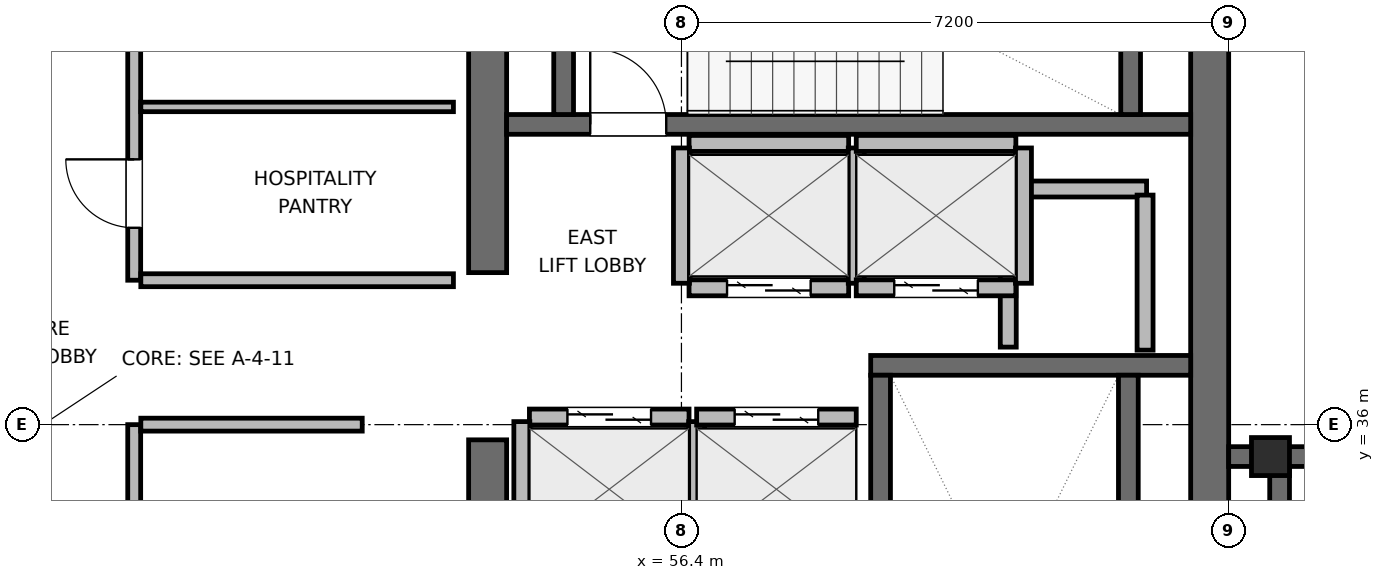
"""IFC4 building model, lengths in metres.
Left out: names, types, materials, properties, quantities, classifications, styles, units other than length and angle.
Written with IfcOpenShell. Run it as: python <this file> out.ifc"""

import sys

from ifc_helpers import new_model, si_unit, direction, frame, frame_2d, origin, origin_2d, place, context, subcontext, project, spatial, rectangle, hollow_rectangle, extrude, element, fill, save


model = new_model("IFC4")
c1 = context("Model", 3, precision=1e-05, world=origin(), true_north=direction((0.0, 1.0)))
c2 = subcontext(c1, "Body", "Model", "MODEL_VIEW")
j1 = project(units=[si_unit("LENGTHUNIT", "METRE"), si_unit("PLANEANGLEUNIT", "RADIAN")], contexts=[c1])
p1 = place(None, origin())
s1 = spatial("IfcSite", under=j1, at=p1, CompositionType="ELEMENT")
p2 = place(p1, origin())
s2 = spatial("IfcBuilding", under=s1, at=p2, CompositionType="ELEMENT")
p3 = place(p2, frame((0.0, 0.0, 350.4)))
s3 = spatial("IfcBuildingStorey", under=s2, at=p3, CompositionType="ELEMENT", Elevation=350.4)
p4 = place(p3, frame((53.85, 27.85, 0.0), z_axis=(0.0, 0.0, 1.0), x_axis=(0.0, 1.0, 0.0)))
e1 = element("IfcWall", 1, at=p4, inside=s3, PredefinedType="SHEAR", context=c2, shape_type="SweptSolid", body=[
    extrude(rectangle(XDim=7.95, YDim=0.5, at=frame_2d((3.975, 0.0))), origin(), (0.0, 0.0, 1.0), 4.5),
])
p5 = place(p3, frame((53.85, 38.0, 0.0), z_axis=(0.0, 0.0, 1.0), x_axis=(0.0, 1.0, 0.0)))
e2 = element("IfcWall", 2, at=p5, inside=s3, PredefinedType="SHEAR", context=c2, shape_type="SweptSolid", body=[
    extrude(rectangle(XDim=6.15, YDim=0.5, at=frame_2d((3.075, 0.0))), origin(), (0.0, 0.0, 1.0), 4.5),
])
p6 = place(p3, frame((63.35, 27.6, 0.0), z_axis=(0.0, 0.0, 1.0), x_axis=(0.0, 1.0, 0.0)))
e3 = element("IfcWall", 3, at=p6, inside=s3, PredefinedType="SHEAR", context=c2, shape_type="SweptSolid", body=[
    extrude(rectangle(XDim=16.8, YDim=0.5, at=frame_2d((8.4, 0.0))), origin(), (0.0, 0.0, 1.0), 4.5),
])
p7 = place(p3, frame((58.89, 36.78, 0.0), z_axis=(0.0, 0.0, 1.0), x_axis=(1.0, 0.0, 0.0)))
e4 = element("IfcWall", 4, at=p7, inside=s3, PredefinedType="SHEAR", context=c2, shape_type="SweptSolid", body=[
    extrude(rectangle(XDim=4.21, YDim=0.26, at=frame_2d((2.105, 0.0))), origin(), (0.0, 0.0, 1.0), 4.5),
])
p8 = place(p3, frame((59.02, 29.05, 0.0), z_axis=(0.0, 0.0, 1.0), x_axis=(0.0, 1.0, 0.0)))
e5 = element("IfcWall", 5, at=p8, inside=s3, PredefinedType="SHEAR", context=c2, shape_type="SweptSolid", body=[
    extrude(rectangle(XDim=7.6, YDim=0.26, at=frame_2d((3.8, 0.0))), origin(), (0.0, 0.0, 1.0), 4.5),
])
p9 = place(p8, frame((0.3, 0.0, 0.0)))
e6 = element("IfcOpeningElement", 6, at=p9, cuts=e5, PredefinedType="OPENING", context=c2, shape_type="SweptSolid", body=[
    extrude(rectangle(XDim=1.0, YDim=2.04, at=frame_2d((0.5, 1.02))), frame((0.0, 0.14, 0.0), z_axis=(0.0, -1.0, 0.0), x_axis=(1.0, 0.0, 0.0)), (0.0, 0.0, 1.0), 0.28),
])
p10 = place(p3, frame((62.28, 29.05, 0.0), z_axis=(0.0, 0.0, 1.0), x_axis=(0.0, 1.0, 0.0)))
e7 = element("IfcWall", 7, at=p10, inside=s3, PredefinedType="SHEAR", context=c2, shape_type="SweptSolid", body=[
    extrude(rectangle(XDim=7.6, YDim=0.26, at=frame_2d((3.8, 0.0))), origin(), (0.0, 0.0, 1.0), 4.5),
])
p11 = place(p3, frame((54.1, 39.95, 0.0), z_axis=(0.0, 0.0, 1.0), x_axis=(1.0, 0.0, 0.0)))
e8 = element("IfcWall", 8, at=p11, inside=s3, PredefinedType="SHEAR", context=c2, shape_type="SweptSolid", body=[
    extrude(rectangle(XDim=9.0, YDim=0.26, at=frame_2d((4.5, 0.0))), origin(), (0.0, 0.0, 1.0), 4.5),
])
p12 = place(p11, frame((1.1, 0.0, 0.0)))
e9 = element("IfcOpeningElement", 9, at=p12, cuts=e8, PredefinedType="OPENING", context=c2, shape_type="SweptSolid", body=[
    extrude(rectangle(XDim=1.0, YDim=2.04, at=frame_2d((0.5, 1.02))), frame((0.0, 0.14, 0.0), z_axis=(0.0, -1.0, 0.0), x_axis=(1.0, 0.0, 0.0)), (0.0, 0.0, 1.0), 0.28),
])
for number, where, z_axis, x_axis in (
    (10, (54.85, 40.08, 0.0), (0.0, 0.0, 1.0), (0.0, 1.0, 0.0)),
    (11, (62.31, 40.08, 0.0), (0.0, 0.0, 1.0), (0.0, 1.0, 0.0)),
):
    element("IfcWall", number, at=place(p3, frame(where, z_axis=z_axis, x_axis=x_axis)), inside=s3, PredefinedType="SHEAR", context=c2, shape_type="SweptSolid", body=[
        extrude(rectangle(XDim=2.94, YDim=0.26, at=frame_2d((1.47, 0.0))), origin(), (0.0, 0.0, 1.0), 4.5),
    ])
p13 = place(p3, frame((63.6, 35.58, 0.0), z_axis=(0.0, 0.0, 1.0), x_axis=(1.0, 0.0, 0.0)))
e12 = element("IfcWall", 12, at=p13, inside=s3, PredefinedType="SHEAR", context=c2, shape_type="SweptSolid", body=[
    extrude(rectangle(XDim=4.06, YDim=0.26, at=frame_2d((2.03, 0.0))), origin(), (0.0, 0.0, 1.0), 4.5),
])
p14 = place(p3, frame((64.27, 28.0, 0.0), z_axis=(0.0, 0.0, 1.0), x_axis=(0.0, 1.0, 0.0)))
e13 = element("IfcWall", 13, at=p14, inside=s3, PredefinedType="SHEAR", context=c2, shape_type="SweptSolid", body=[
    extrude(rectangle(XDim=7.45, YDim=0.26, at=frame_2d((3.725, 0.0))), origin(), (0.0, 0.0, 1.0), 4.5),
])
p15 = place(p3, frame((64.15, 35.58, 0.0), z_axis=(0.0, 0.0, 1.0), x_axis=(1.0, 0.0, 0.0)))
e14 = element("IfcColumn", 14, at=p15, inside=s3, PredefinedType="PILASTER", context=c2, shape_type="SweptSolid", body=[
    extrude(hollow_rectangle(XDim=0.5, YDim=0.5, WallThickness=0.025, at=origin_2d()), origin(), (0.0, 0.0, 1.0), 4.5),
])
p16 = place(p3, frame((60.72, 39.1, 0.0), z_axis=(0.0, 0.0, 1.0), x_axis=(1.0, 0.0, 0.0)))
e15 = element("IfcWall", 15, at=p16, inside=s3, PredefinedType="PARTITIONING", context=c2, shape_type="SweptSolid", body=[
    extrude(rectangle(XDim=1.8, YDim=0.21, at=frame_2d((0.9, 0.0))), origin(), (0.0, 0.0, 1.0), 4.2),
])
p17 = place(p3, frame((60.7, 37.02, 0.0), z_axis=(0.0, 0.0, 1.0), x_axis=(0.0, 1.0, 0.0)))
e16 = element("IfcWall", 16, at=p17, inside=s3, PredefinedType="PARTITIONING", context=c2, shape_type="SweptSolid", body=[
    extrude(rectangle(XDim=1.96, YDim=0.21, at=frame_2d((0.98, 0.0))), origin(), (0.0, 0.0, 1.0), 4.2),
])
p18 = place(p3, frame((62.5, 36.98, 0.0), z_axis=(0.0, 0.0, 1.0), x_axis=(0.0, 1.0, 0.0)))
e17 = element("IfcWall", 17, at=p18, inside=s3, PredefinedType="PARTITIONING", context=c2, shape_type="SweptSolid", body=[
    extrude(rectangle(XDim=2.04, YDim=0.21, at=frame_2d((1.02, 0.0))), origin(), (0.0, 0.0, 1.0), 4.2),
])
p19 = place(p3, frame((54.4, 36.1, 0.0), z_axis=(0.0, 0.0, 1.0), x_axis=(1.0, 0.0, 0.0)))
e18 = element("IfcWall", 18, at=p19, inside=s3, PredefinedType="PARTITIONING", context=c2, shape_type="SweptSolid", body=[
    extrude(rectangle(XDim=2.1, YDim=0.21, at=frame_2d((1.05, 0.0))), origin(), (0.0, 0.0, 1.0), 4.2),
])
p20 = place(p19, frame((0.5, 0.0, 0.0)))
e19 = element("IfcOpeningElement", 19, at=p20, cuts=e18, PredefinedType="OPENING", context=c2, shape_type="SweptSolid", body=[
    extrude(rectangle(XDim=1.1, YDim=2.04, at=frame_2d((0.55, 1.02))), frame((0.0, 0.115, 0.0), z_axis=(0.0, -1.0, 0.0), x_axis=(1.0, 0.0, 0.0)), (0.0, 0.0, 1.0), 0.23),
])
for number, where, z_axis, x_axis in (
    (20, (54.3, 34.26, 0.0), (0.0, 0.0, 1.0), (0.0, 1.0, 0.0)),
    (21, (56.6, 34.26, 0.0), (0.0, 0.0, 1.0), (0.0, 1.0, 0.0)),
):
    element("IfcWall", number, at=place(p3, frame(where, z_axis=z_axis, x_axis=x_axis)), inside=s3, PredefinedType="PARTITIONING", context=c2, shape_type="SweptSolid", body=[
        extrude(rectangle(XDim=1.78, YDim=0.21, at=frame_2d((0.89, 0.0))), origin(), (0.0, 0.0, 1.0), 4.2),
    ])
p21 = place(p3, frame((56.6, 36.1, 0.0), z_axis=(0.0, 0.0, 1.0), x_axis=(1.0, 0.0, 0.0)))
e22 = element("IfcWall", 22, at=p21, inside=s3, PredefinedType="PARTITIONING", context=c2, shape_type="SweptSolid", body=[
    extrude(rectangle(XDim=2.1, YDim=0.21, at=frame_2d((1.05, 0.0))), origin(), (0.0, 0.0, 1.0), 4.2),
])
p22 = place(p21, frame((0.5, 0.0, 0.0)))
e23 = element("IfcOpeningElement", 23, at=p22, cuts=e22, PredefinedType="OPENING", context=c2, shape_type="SweptSolid", body=[
    extrude(rectangle(XDim=1.1, YDim=2.04, at=frame_2d((0.55, 1.02))), frame((0.0, 0.115, 0.0), z_axis=(0.0, -1.0, 0.0), x_axis=(1.0, 0.0, 0.0)), (0.0, 0.0, 1.0), 0.23),
])
p23 = place(p3, frame((56.5, 37.8, 0.0), z_axis=(0.0, 0.0, 1.0), x_axis=(1.0, 0.0, 0.0)))
e24 = element("IfcWall", 24, at=p23, inside=s3, PredefinedType="PARTITIONING", context=c2, shape_type="SweptSolid", body=[
    extrude(rectangle(XDim=2.1, YDim=0.21, at=frame_2d((1.05, 0.0))), origin(), (0.0, 0.0, 1.0), 4.2),
])
p24 = place(p23, frame((0.5, 0.0, 0.0)))
e25 = element("IfcOpeningElement", 25, at=p24, cuts=e24, PredefinedType="OPENING", context=c2, shape_type="SweptSolid", body=[
    extrude(rectangle(XDim=1.1, YDim=2.04, at=frame_2d((0.55, 1.02))), frame((0.0, 0.115, 0.0), z_axis=(0.0, -1.0, 0.0), x_axis=(1.0, 0.0, 0.0)), (0.0, 0.0, 1.0), 0.23),
])
p25 = place(p3, frame((56.5, 39.7, 0.0), z_axis=(0.0, 0.0, 1.0), x_axis=(1.0, 0.0, 0.0)))
e26 = element("IfcWall", 26, at=p25, inside=s3, PredefinedType="PARTITIONING", context=c2, shape_type="SweptSolid", body=[
    extrude(rectangle(XDim=2.1, YDim=0.21, at=frame_2d((1.05, 0.0))), origin(), (0.0, 0.0, 1.0), 4.2),
])
for number, where, z_axis, x_axis in (
    (27, (56.4, 37.86, 0.0), (0.0, 0.0, 1.0), (0.0, 1.0, 0.0)),
    (28, (58.7, 37.86, 0.0), (0.0, 0.0, 1.0), (0.0, 1.0, 0.0)),
):
    element("IfcWall", number, at=place(p3, frame(where, z_axis=z_axis, x_axis=x_axis)), inside=s3, PredefinedType="PARTITIONING", context=c2, shape_type="SweptSolid", body=[
        extrude(rectangle(XDim=1.78, YDim=0.21, at=frame_2d((0.89, 0.0))), origin(), (0.0, 0.0, 1.0), 4.2),
    ])
p26 = place(p3, frame((58.7, 37.8, 0.0), z_axis=(0.0, 0.0, 1.0), x_axis=(1.0, 0.0, 0.0)))
e29 = element("IfcWall", 29, at=p26, inside=s3, PredefinedType="PARTITIONING", context=c2, shape_type="SweptSolid", body=[
    extrude(rectangle(XDim=2.1, YDim=0.21, at=frame_2d((1.05, 0.0))), origin(), (0.0, 0.0, 1.0), 4.2),
])
p27 = place(p26, frame((0.5, 0.0, 0.0)))
e30 = element("IfcOpeningElement", 30, at=p27, cuts=e29, PredefinedType="OPENING", context=c2, shape_type="SweptSolid", body=[
    extrude(rectangle(XDim=1.1, YDim=2.04, at=frame_2d((0.55, 1.02))), frame((0.0, 0.115, 0.0), z_axis=(0.0, -1.0, 0.0), x_axis=(1.0, 0.0, 0.0)), (0.0, 0.0, 1.0), 0.23),
])
p28 = place(p3, frame((58.7, 39.7, 0.0), z_axis=(0.0, 0.0, 1.0), x_axis=(1.0, 0.0, 0.0)))
e31 = element("IfcWall", 31, at=p28, inside=s3, PredefinedType="PARTITIONING", context=c2, shape_type="SweptSolid", body=[
    extrude(rectangle(XDim=2.1, YDim=0.21, at=frame_2d((1.05, 0.0))), origin(), (0.0, 0.0, 1.0), 4.2),
])
p29 = place(p3, frame((60.9, 37.86, 0.0), z_axis=(0.0, 0.0, 1.0), x_axis=(0.0, 1.0, 0.0)))
e32 = element("IfcWall", 32, at=p29, inside=s3, PredefinedType="PARTITIONING", context=c2, shape_type="SweptSolid", body=[
    extrude(rectangle(XDim=1.78, YDim=0.21, at=frame_2d((0.89, 0.0))), origin(), (0.0, 0.0, 1.0), 4.2),
])
p30 = place(p3, frame((49.2, 32.6, 0.0), z_axis=(0.0, 0.0, 1.0), x_axis=(0.0, 1.0, 0.0)))
e33 = element("IfcWall", 33, at=p30, inside=s3, PredefinedType="PARTITIONING", context=c2, shape_type="SweptSolid", body=[
    extrude(rectangle(XDim=3.4, YDim=0.17, at=frame_2d((1.7, 0.0))), origin(), (0.0, 0.0, 1.0), 4.2),
])
p31 = place(p30, frame((0.638, 0.0, 0.0)))
e34 = element("IfcOpeningElement", 34, at=p31, cuts=e33, PredefinedType="OPENING", context=c2, shape_type="SweptSolid", body=[
    extrude(rectangle(XDim=0.9, YDim=2.02, at=frame_2d((0.45, 1.01))), frame((0.0, 0.095, 0.0), z_axis=(0.0, -1.0, 0.0), x_axis=(1.0, 0.0, 0.0)), (0.0, 0.0, 1.0), 0.19),
])
p32 = place(p3, frame((49.287, 36.0, 0.0), z_axis=(0.0, 0.0, 1.0), x_axis=(1.0, 0.0, 0.0)))
e35 = element("IfcWall", 35, at=p32, inside=s3, PredefinedType="PARTITIONING", context=c2, shape_type="SweptSolid", body=[
    extrude(rectangle(XDim=2.913, YDim=0.17, at=frame_2d((1.457, 0.0))), origin(), (0.0, 0.0, 1.0), 4.2),
])
p33 = place(p3, frame((49.2, 37.9, 0.0), z_axis=(0.0, 0.0, 1.0), x_axis=(0.0, 1.0, 0.0)))
e36 = element("IfcWall", 36, at=p33, inside=s3, PredefinedType="PARTITIONING", context=c2, shape_type="SweptSolid", body=[
    extrude(rectangle(XDim=6.0, YDim=0.17, at=frame_2d((3.0, 0.0))), origin(), (0.0, 0.0, 1.0), 4.2),
])
p34 = place(p33, frame((0.69, 0.0, 0.0)))
e37 = element("IfcOpeningElement", 37, at=p34, cuts=e36, PredefinedType="OPENING", context=c2, shape_type="SweptSolid", body=[
    extrude(rectangle(XDim=0.9, YDim=2.02, at=frame_2d((0.45, 1.01))), frame((0.0, 0.095, 0.0), z_axis=(0.0, -1.0, 0.0), x_axis=(1.0, 0.0, 0.0)), (0.0, 0.0, 1.0), 0.19),
])
p35 = place(p33, frame((3.69, 0.0, 0.0)))
e38 = element("IfcOpeningElement", 38, at=p35, cuts=e36, PredefinedType="OPENING", context=c2, shape_type="SweptSolid", body=[
    extrude(rectangle(XDim=0.9, YDim=2.02, at=frame_2d((0.45, 1.01))), frame((0.0, 0.095, 0.0), z_axis=(0.0, -1.0, 0.0), x_axis=(1.0, 0.0, 0.0)), (0.0, 0.0, 1.0), 0.19),
])
p36 = place(p3, frame((49.287, 37.9, 0.0), z_axis=(0.0, 0.0, 1.0), x_axis=(1.0, 0.0, 0.0)))
e39 = element("IfcWall", 39, at=p36, inside=s3, PredefinedType="PARTITIONING", context=c2, shape_type="SweptSolid", body=[
    extrude(rectangle(XDim=4.113, YDim=0.17, at=frame_2d((2.056, 0.0))), origin(), (0.0, 0.0, 1.0), 4.2),
])
p37 = place(p3, frame((49.287, 40.18, 0.0), z_axis=(0.0, 0.0, 1.0), x_axis=(1.0, 0.0, 0.0)))
e40 = element("IfcWall", 40, at=p37, inside=s3, PredefinedType="PARTITIONING", context=c2, shape_type="SweptSolid", body=[
    extrude(rectangle(XDim=4.113, YDim=0.125, at=frame_2d((2.056, 0.0))), origin(), (0.0, 0.0, 1.0), 4.2),
])
p38 = place(p12, origin())
e41 = element("IfcDoor", 41, at=p38, inside=s3, OperationType="SINGLE_SWING_LEFT", PredefinedType="DOOR", context=c2, shape_type="SweptSolid", body=[
    extrude(rectangle(XDim=1.0, YDim=2.04, at=frame_2d((0.5, 1.02))), frame((0.0, 0.025, 0.0), z_axis=(0.0, -1.0, 0.0), x_axis=(1.0, 0.0, 0.0)), (0.0, 0.0, 1.0), 0.05),
])
fill(e9, e41)
p39 = place(p20, origin())
e42 = element("IfcDoor", 42, at=p39, inside=s3, OperationType="DOUBLE_DOOR_SLIDING", PredefinedType="DOOR", context=c2, shape_type="SweptSolid", body=[
    extrude(rectangle(XDim=1.1, YDim=2.04, at=frame_2d((0.55, 1.02))), frame((0.0, 0.025, 0.0), z_axis=(0.0, -1.0, 0.0), x_axis=(1.0, 0.0, 0.0)), (0.0, 0.0, 1.0), 0.05),
])
fill(e19, e42)
p40 = place(p22, origin())
e43 = element("IfcDoor", 43, at=p40, inside=s3, OperationType="DOUBLE_DOOR_SLIDING", PredefinedType="DOOR", context=c2, shape_type="SweptSolid", body=[
    extrude(rectangle(XDim=1.1, YDim=2.04, at=frame_2d((0.55, 1.02))), frame((0.0, 0.025, 0.0), z_axis=(0.0, -1.0, 0.0), x_axis=(1.0, 0.0, 0.0)), (0.0, 0.0, 1.0), 0.05),
])
fill(e23, e43)
p41 = place(p24, origin())
e44 = element("IfcDoor", 44, at=p41, inside=s3, OperationType="DOUBLE_DOOR_SLIDING", PredefinedType="DOOR", context=c2, shape_type="SweptSolid", body=[
    extrude(rectangle(XDim=1.1, YDim=2.04, at=frame_2d((0.55, 1.02))), frame((0.0, 0.025, 0.0), z_axis=(0.0, -1.0, 0.0), x_axis=(1.0, 0.0, 0.0)), (0.0, 0.0, 1.0), 0.05),
])
fill(e25, e44)
p42 = place(p27, origin())
e45 = element("IfcDoor", 45, at=p42, inside=s3, OperationType="DOUBLE_DOOR_SLIDING", PredefinedType="DOOR", context=c2, shape_type="SweptSolid", body=[
    extrude(rectangle(XDim=1.1, YDim=2.04, at=frame_2d((0.55, 1.02))), frame((0.0, 0.025, 0.0), z_axis=(0.0, -1.0, 0.0), x_axis=(1.0, 0.0, 0.0)), (0.0, 0.0, 1.0), 0.05),
])
fill(e30, e45)
p43 = place(p34, origin())
e46 = element("IfcDoor", 46, at=p43, inside=s3, OperationType="SINGLE_SWING_RIGHT", PredefinedType="DOOR", context=c2, shape_type="SweptSolid", body=[
    extrude(rectangle(XDim=0.9, YDim=2.02, at=frame_2d((0.45, 1.01))), frame((0.0, 0.025, 0.0), z_axis=(0.0, -1.0, 0.0), x_axis=(1.0, 0.0, 0.0)), (0.0, 0.0, 1.0), 0.05),
])
fill(e37, e46)
save(model, sys.argv[1])
